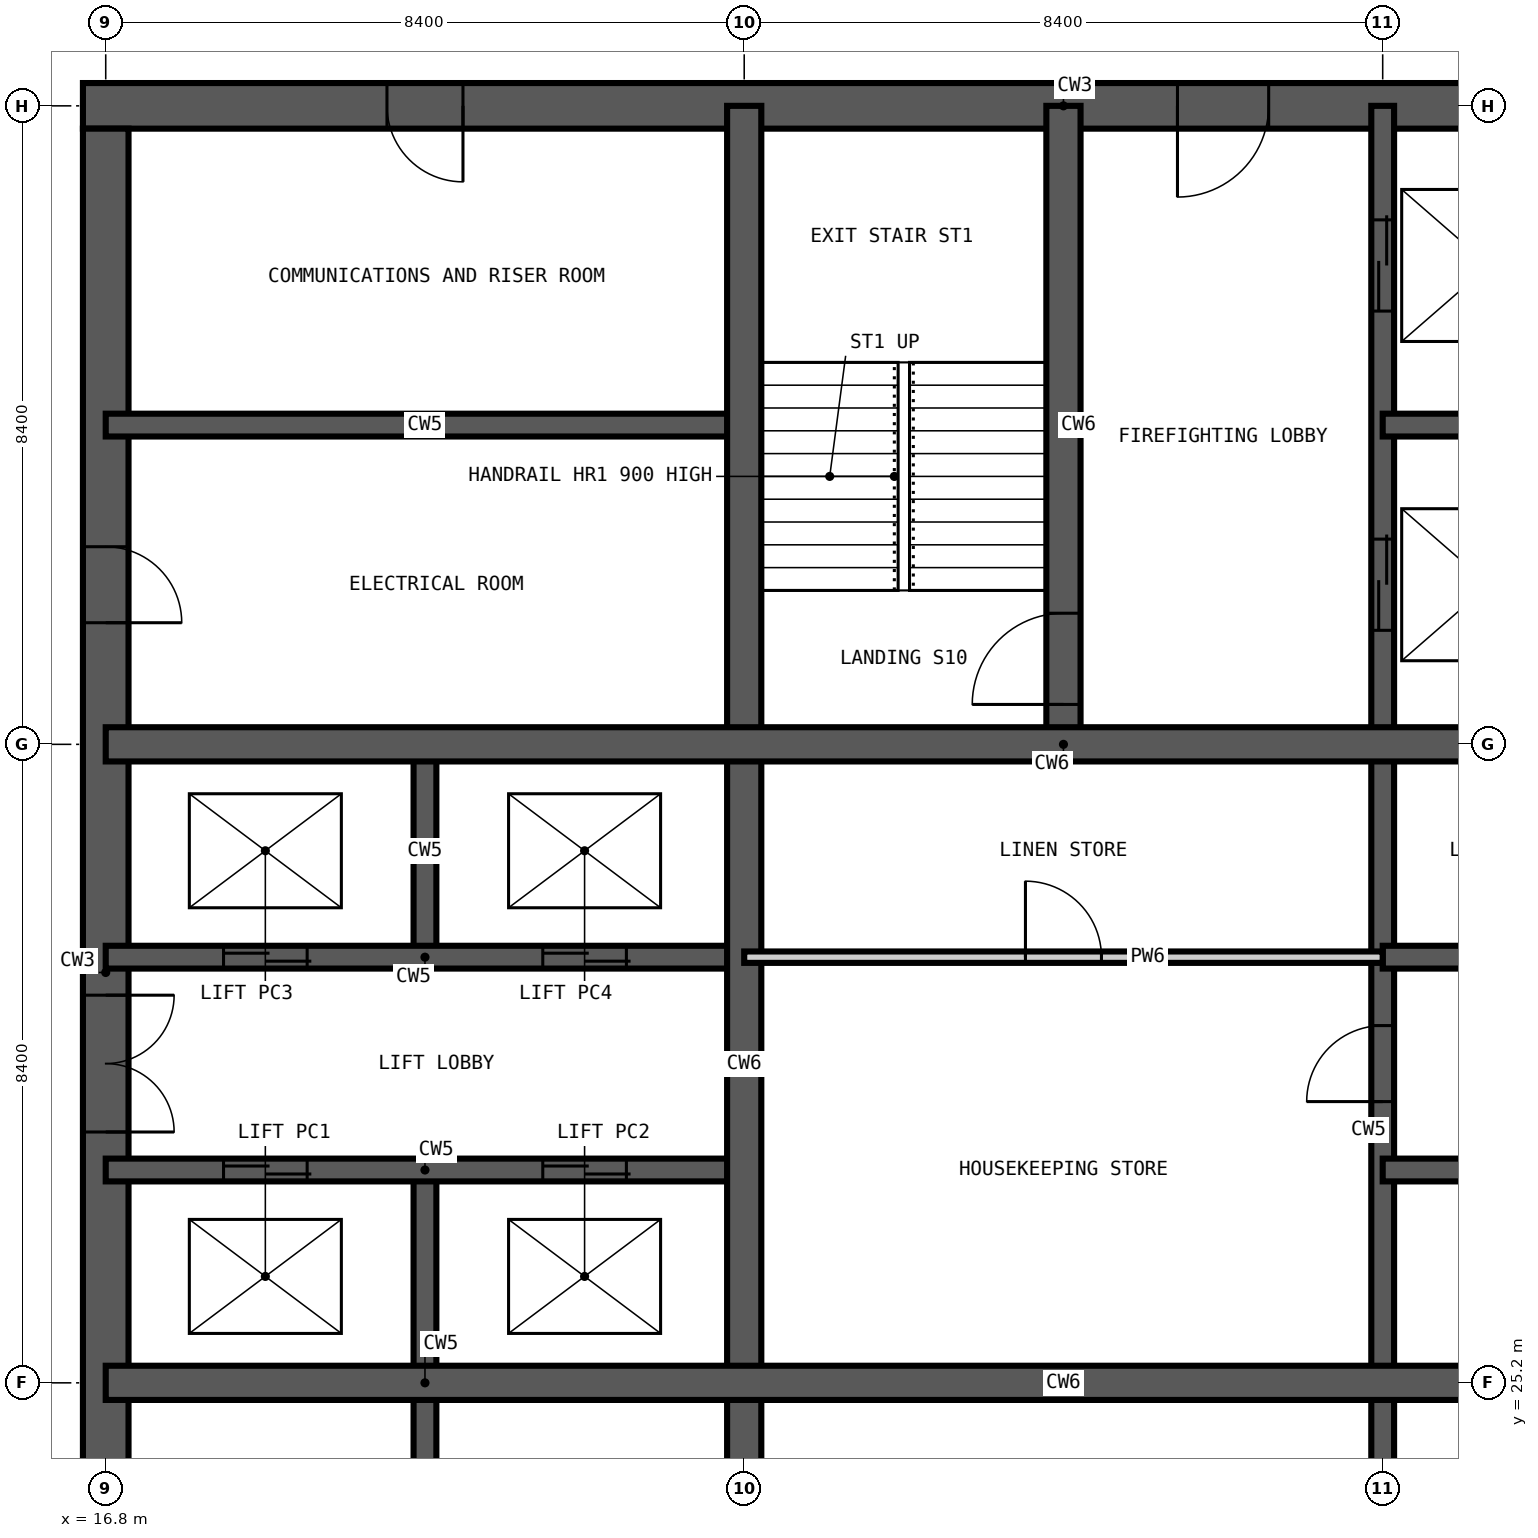
"""IFC4 building model, lengths in metres.
Left out: names, types, materials, properties, quantities, classifications, styles, units other than length and angle.
Written with IfcOpenShell. Run it as: python <this file> out.ifc"""

import sys

from ifc_helpers import new_model, si_unit, direction, frame, frame_2d, origin, place, context, subcontext, project, spatial, rectangle, extrude, element, fill, save


model = new_model("IFC4")
c1 = context("Model", 3, precision=1e-05, world=origin(), true_north=direction((0.0, 1.0)))
c2 = subcontext(c1, "Body", "Model", "MODEL_VIEW")
j1 = project(units=[si_unit("LENGTHUNIT", "METRE"), si_unit("PLANEANGLEUNIT", "RADIAN")], contexts=[c1])
p1 = place(None, origin())
s1 = spatial("IfcSite", under=j1, at=p1, CompositionType="ELEMENT")
p2 = place(p1, origin())
s2 = spatial("IfcBuilding", under=s1, at=p2, CompositionType="ELEMENT")
p3 = place(p2, frame((0.0, 0.0, 198.6)))
s3 = spatial("IfcBuildingStorey", under=s2, at=p3, CompositionType="ELEMENT", Elevation=198.6)
p4 = place(p3, frame((42.3, 42.0, -0.35), z_axis=(0.0, 0.0, 1.0), x_axis=(-1.0, 0.0, 0.0)))
e1 = element("IfcWall", 1, at=p4, inside=s3, PredefinedType="SHEAR", context=c2, shape_type="SweptSolid", body=[
    extrude(rectangle(XDim=25.8, YDim=0.6, at=frame_2d((12.9, 0.0))), origin(), (0.0, 0.0, 1.0), 3.6),
])
p5 = place(p4, frame((20.8, 0.0, 0.35)))
e2 = element("IfcOpeningElement", 2, at=p5, cuts=e1, PredefinedType="OPENING", context=c2, shape_type="SweptSolid", body=[
    extrude(rectangle(XDim=1.0, YDim=2.1, at=frame_2d((0.5, 1.05))), frame((0.0, 0.31, 0.0), z_axis=(0.0, -1.0, 0.0), x_axis=(1.0, 0.0, 0.0)), (0.0, 0.0, 1.0), 0.62),
])
p6 = place(p4, frame((10.2, 0.0, 0.35)))
e3 = element("IfcOpeningElement", 3, at=p6, cuts=e1, PredefinedType="OPENING", context=c2, shape_type="SweptSolid", body=[
    extrude(rectangle(XDim=1.2, YDim=2.2, at=frame_2d((0.6, 1.1))), frame((0.0, 0.31, 0.0), z_axis=(0.0, -1.0, 0.0), x_axis=(1.0, 0.0, 0.0)), (0.0, 0.0, 1.0), 0.62),
])
p7 = place(p3, frame((16.8, 41.7, -0.35), z_axis=(0.0, 0.0, 1.0), x_axis=(0.0, -1.0, 0.0)))
e4 = element("IfcWall", 4, at=p7, inside=s3, PredefinedType="SHEAR", context=c2, shape_type="SweptSolid", body=[
    extrude(rectangle(XDim=24.6, YDim=0.6, at=frame_2d((12.3, 0.0))), origin(), (0.0, 0.0, 1.0), 3.6),
])
p8 = place(p7, frame((11.4, 0.0, 0.35)))
e5 = element("IfcOpeningElement", 5, at=p8, cuts=e4, PredefinedType="OPENING", context=c2, shape_type="SweptSolid", body=[
    extrude(rectangle(XDim=1.8, YDim=2.2, at=frame_2d((0.9, 1.1))), frame((0.0, 0.31, 0.0), z_axis=(0.0, -1.0, 0.0), x_axis=(1.0, 0.0, 0.0)), (0.0, 0.0, 1.0), 0.62),
])
p9 = place(p7, frame((20.2, 0.0, 0.35)))
e6 = element("IfcOpeningElement", 6, at=p9, cuts=e4, PredefinedType="OPENING", context=c2, shape_type="SweptSolid", body=[
    extrude(rectangle(XDim=1.0, YDim=2.1, at=frame_2d((0.5, 1.05))), frame((0.0, 0.31, 0.0), z_axis=(0.0, -1.0, 0.0), x_axis=(1.0, 0.0, 0.0)), (0.0, 0.0, 1.0), 0.62),
])
p10 = place(p7, frame((5.5, 0.0, 0.35)))
e7 = element("IfcOpeningElement", 7, at=p10, cuts=e4, PredefinedType="OPENING", context=c2, shape_type="SweptSolid", body=[
    extrude(rectangle(XDim=1.0, YDim=2.1, at=frame_2d((0.5, 1.05))), frame((0.0, 0.31, 0.0), z_axis=(0.0, -1.0, 0.0), x_axis=(1.0, 0.0, 0.0)), (0.0, 0.0, 1.0), 0.62),
])
p11 = place(p3, frame((21.0, 22.4, -0.35), z_axis=(0.0, 0.0, 1.0), x_axis=(0.0, 1.0, 0.0)))
e8 = element("IfcWall", 8, at=p11, inside=s3, PredefinedType="SHEAR", context=c2, shape_type="SweptSolid", body=[
    extrude(rectangle(XDim=5.6, YDim=0.3, at=frame_2d((2.8, 0.0))), origin(), (0.0, 0.0, 1.0), 3.6),
])
p12 = place(p3, frame((21.0, 30.8, -0.35), z_axis=(0.0, 0.0, 1.0), x_axis=(0.0, 1.0, 0.0)))
e9 = element("IfcWall", 9, at=p12, inside=s3, PredefinedType="SHEAR", context=c2, shape_type="SweptSolid", body=[
    extrude(rectangle(XDim=2.8, YDim=0.3, at=frame_2d((1.4, 0.0))), origin(), (0.0, 0.0, 1.0), 3.6),
])
p13 = place(p3, frame((33.6, 16.8, -0.35), z_axis=(0.0, 0.0, 1.0), x_axis=(0.0, 1.0, 0.0)))
e10 = element("IfcWall", 10, at=p13, inside=s3, PredefinedType="SHEAR", context=c2, shape_type="SweptSolid", body=[
    extrude(rectangle(XDim=25.2, YDim=0.3, at=frame_2d((12.6, 0.0))), origin(), (0.0, 0.0, 1.0), 3.6),
])
p14 = place(p13, frame((22.5, 0.0, 0.35)))
e11 = element("IfcOpeningElement", 11, at=p14, cuts=e10, PredefinedType="OPENING", context=c2, shape_type="SweptSolid", body=[
    extrude(rectangle(XDim=1.2, YDim=2.2, at=frame_2d((0.6, 1.1))), frame((0.0, 0.16, 0.0), z_axis=(0.0, -1.0, 0.0), x_axis=(1.0, 0.0, 0.0)), (0.0, 0.0, 1.0), 0.32),
])
p15 = place(p13, frame((18.3, 0.0, 0.35)))
e12 = element("IfcOpeningElement", 12, at=p15, cuts=e10, PredefinedType="OPENING", context=c2, shape_type="SweptSolid", body=[
    extrude(rectangle(XDim=1.2, YDim=2.2, at=frame_2d((0.6, 1.1))), frame((0.0, 0.16, 0.0), z_axis=(0.0, -1.0, 0.0), x_axis=(1.0, 0.0, 0.0)), (0.0, 0.0, 1.0), 0.32),
])
p16 = place(p13, frame((12.1, 0.0, 0.35)))
e13 = element("IfcOpeningElement", 13, at=p16, cuts=e10, PredefinedType="OPENING", context=c2, shape_type="SweptSolid", body=[
    extrude(rectangle(XDim=1.0, YDim=2.1, at=frame_2d((0.5, 1.05))), frame((0.0, 0.16, 0.0), z_axis=(0.0, -1.0, 0.0), x_axis=(1.0, 0.0, 0.0)), (0.0, 0.0, 1.0), 0.32),
])
p17 = place(p3, frame((16.8, 28.0, -0.35), z_axis=(0.0, 0.0, 1.0), x_axis=(1.0, 0.0, 0.0)))
e14 = element("IfcWall", 14, at=p17, inside=s3, PredefinedType="SHEAR", context=c2, shape_type="SweptSolid", body=[
    extrude(rectangle(XDim=8.4, YDim=0.3, at=frame_2d((4.2, 0.0))), origin(), (0.0, 0.0, 1.0), 3.6),
])
p18 = place(p17, frame((1.55, 0.0, 0.35)))
e15 = element("IfcOpeningElement", 15, at=p18, cuts=e14, PredefinedType="OPENING", context=c2, shape_type="SweptSolid", body=[
    extrude(rectangle(XDim=1.1, YDim=2.2, at=frame_2d((0.55, 1.1))), frame((0.0, 0.16, 0.0), z_axis=(0.0, -1.0, 0.0), x_axis=(1.0, 0.0, 0.0)), (0.0, 0.0, 1.0), 0.32),
])
p19 = place(p17, frame((5.75, 0.0, 0.35)))
e16 = element("IfcOpeningElement", 16, at=p19, cuts=e14, PredefinedType="OPENING", context=c2, shape_type="SweptSolid", body=[
    extrude(rectangle(XDim=1.1, YDim=2.2, at=frame_2d((0.55, 1.1))), frame((0.0, 0.16, 0.0), z_axis=(0.0, -1.0, 0.0), x_axis=(1.0, 0.0, 0.0)), (0.0, 0.0, 1.0), 0.32),
])
p20 = place(p3, frame((33.6, 28.0, -0.35), z_axis=(0.0, 0.0, 1.0), x_axis=(1.0, 0.0, 0.0)))
e17 = element("IfcWall", 17, at=p20, inside=s3, PredefinedType="SHEAR", context=c2, shape_type="SweptSolid", body=[
    extrude(rectangle(XDim=8.4, YDim=0.3, at=frame_2d((4.2, 0.0))), origin(), (0.0, 0.0, 1.0), 3.6),
])
p21 = place(p20, frame((1.6, 0.0, 0.35)))
e18 = element("IfcOpeningElement", 18, at=p21, cuts=e17, PredefinedType="OPENING", context=c2, shape_type="SweptSolid", body=[
    extrude(rectangle(XDim=1.0, YDim=2.1, at=frame_2d((0.5, 1.05))), frame((0.0, 0.16, 0.0), z_axis=(0.0, -1.0, 0.0), x_axis=(1.0, 0.0, 0.0)), (0.0, 0.0, 1.0), 0.32),
])
p22 = place(p20, frame((4.6, 0.0, 0.35)))
e19 = element("IfcOpeningElement", 19, at=p22, cuts=e17, PredefinedType="OPENING", context=c2, shape_type="SweptSolid", body=[
    extrude(rectangle(XDim=1.0, YDim=2.1, at=frame_2d((0.5, 1.05))), frame((0.0, 0.16, 0.0), z_axis=(0.0, -1.0, 0.0), x_axis=(1.0, 0.0, 0.0)), (0.0, 0.0, 1.0), 0.32),
])
p23 = place(p3, frame((16.8, 30.8, -0.35), z_axis=(0.0, 0.0, 1.0), x_axis=(1.0, 0.0, 0.0)))
e20 = element("IfcWall", 20, at=p23, inside=s3, PredefinedType="SHEAR", context=c2, shape_type="SweptSolid", body=[
    extrude(rectangle(XDim=8.4, YDim=0.3, at=frame_2d((4.2, 0.0))), origin(), (0.0, 0.0, 1.0), 3.6),
])
p24 = place(p23, frame((1.55, 0.0, 0.35)))
e21 = element("IfcOpeningElement", 21, at=p24, cuts=e20, PredefinedType="OPENING", context=c2, shape_type="SweptSolid", body=[
    extrude(rectangle(XDim=1.1, YDim=2.2, at=frame_2d((0.55, 1.1))), frame((0.0, 0.16, 0.0), z_axis=(0.0, -1.0, 0.0), x_axis=(1.0, 0.0, 0.0)), (0.0, 0.0, 1.0), 0.32),
])
p25 = place(p23, frame((5.75, 0.0, 0.35)))
e22 = element("IfcOpeningElement", 22, at=p25, cuts=e20, PredefinedType="OPENING", context=c2, shape_type="SweptSolid", body=[
    extrude(rectangle(XDim=1.1, YDim=2.2, at=frame_2d((0.55, 1.1))), frame((0.0, 0.16, 0.0), z_axis=(0.0, -1.0, 0.0), x_axis=(1.0, 0.0, 0.0)), (0.0, 0.0, 1.0), 0.32),
])
for number, where, z_axis, x_axis in (
    (23, (33.6, 30.8, -0.35), (0.0, 0.0, 1.0), (1.0, 0.0, 0.0)),
    (24, (16.8, 37.8, -0.35), (0.0, 0.0, 1.0), (1.0, 0.0, 0.0)),
):
    element("IfcWall", number, at=place(p3, frame(where, z_axis=z_axis, x_axis=x_axis)), inside=s3, PredefinedType="SHEAR", context=c2, shape_type="SweptSolid", body=[
        extrude(rectangle(XDim=8.4, YDim=0.3, at=frame_2d((4.2, 0.0))), origin(), (0.0, 0.0, 1.0), 3.6),
    ])
p26 = place(p3, frame((33.6, 37.8, -0.35), z_axis=(0.0, 0.0, 1.0), x_axis=(1.0, 0.0, 0.0)))
e25 = element("IfcWall", 25, at=p26, inside=s3, PredefinedType="SHEAR", context=c2, shape_type="SweptSolid", body=[
    extrude(rectangle(XDim=2.8, YDim=0.3, at=frame_2d((1.4, 0.0))), origin(), (0.0, 0.0, 1.0), 3.6),
])
p27 = place(p3, frame((25.2, 16.8, -0.35), z_axis=(0.0, 0.0, 1.0), x_axis=(0.0, 1.0, 0.0)))
e26 = element("IfcWall", 26, at=p27, inside=s3, PredefinedType="SHEAR", context=c2, shape_type="SweptSolid", body=[
    extrude(rectangle(XDim=25.2, YDim=0.45, at=frame_2d((12.6, 0.0))), origin(), (0.0, 0.0, 1.0), 3.6),
])
p28 = place(p3, frame((29.4, 33.6, -0.35), z_axis=(0.0, 0.0, 1.0), x_axis=(0.0, 1.0, 0.0)))
e27 = element("IfcWall", 27, at=p28, inside=s3, PredefinedType="SHEAR", context=c2, shape_type="SweptSolid", body=[
    extrude(rectangle(XDim=8.4, YDim=0.45, at=frame_2d((4.2, 0.0))), origin(), (0.0, 0.0, 1.0), 3.6),
])
p29 = place(p28, frame((0.525, 0.0, 0.35)))
e28 = element("IfcOpeningElement", 28, at=p29, cuts=e27, PredefinedType="OPENING", context=c2, shape_type="SweptSolid", body=[
    extrude(rectangle(XDim=1.2, YDim=2.2, at=frame_2d((0.6, 1.1))), frame((0.0, 0.235, 0.0), z_axis=(0.0, -1.0, 0.0), x_axis=(1.0, 0.0, 0.0)), (0.0, 0.0, 1.0), 0.47),
])
for number, where, z_axis, x_axis in (
    (29, (16.8, 25.2, -0.35), (0.0, 0.0, 1.0), (1.0, 0.0, 0.0)),
    (30, (16.8, 33.6, -0.35), (0.0, 0.0, 1.0), (1.0, 0.0, 0.0)),
):
    element("IfcWall", number, at=place(p3, frame(where, z_axis=z_axis, x_axis=x_axis)), inside=s3, PredefinedType="SHEAR", context=c2, shape_type="SweptSolid", body=[
        extrude(rectangle(XDim=25.2, YDim=0.45, at=frame_2d((12.6, 0.0))), origin(), (0.0, 0.0, 1.0), 3.6),
    ])
p30 = place(p3, frame((25.2, 30.8, 0.0), z_axis=(0.0, 0.0, 1.0), x_axis=(1.0, 0.0, 0.0)))
e31 = element("IfcWall", 31, at=p30, inside=s3, PredefinedType="PARTITIONING", context=c2, shape_type="SweptSolid", body=[
    extrude(rectangle(XDim=8.4, YDim=0.15, at=frame_2d((4.2, 0.0))), origin(), (0.0, 0.0, 1.0), 3.25),
])
p31 = place(p30, frame((3.7, 0.0, 0.0)))
e32 = element("IfcOpeningElement", 32, at=p31, cuts=e31, PredefinedType="OPENING", context=c2, shape_type="SweptSolid", body=[
    extrude(rectangle(XDim=1.0, YDim=2.1, at=frame_2d((0.5, 1.05))), frame((0.0, 0.085, 0.0), z_axis=(0.0, -1.0, 0.0), x_axis=(1.0, 0.0, 0.0)), (0.0, 0.0, 1.0), 0.17),
])
p32 = place(p29, origin())
e33 = element("IfcDoor", 33, at=p32, inside=s3, OperationType="SINGLE_SWING_LEFT", PredefinedType="DOOR", context=c2, shape_type="SweptSolid", body=[
    extrude(rectangle(XDim=1.2, YDim=2.2, at=frame_2d((0.6, 1.1))), frame((0.0, 0.025, 0.0), z_axis=(0.0, -1.0, 0.0), x_axis=(1.0, 0.0, 0.0)), (0.0, 0.0, 1.0), 0.05),
])
fill(e28, e33)
p33 = place(p18, origin())
e34 = element("IfcDoor", 34, at=p33, inside=s3, OperationType="DOUBLE_DOOR_SLIDING", PredefinedType="DOOR", context=c2, shape_type="SweptSolid", body=[
    extrude(rectangle(XDim=1.1, YDim=2.2, at=frame_2d((0.55, 1.1))), frame((0.0, 0.025, 0.0), z_axis=(0.0, -1.0, 0.0), x_axis=(1.0, 0.0, 0.0)), (0.0, 0.0, 1.0), 0.05),
])
fill(e15, e34)
p34 = place(p19, origin())
e35 = element("IfcDoor", 35, at=p34, inside=s3, OperationType="DOUBLE_DOOR_SLIDING", PredefinedType="DOOR", context=c2, shape_type="SweptSolid", body=[
    extrude(rectangle(XDim=1.1, YDim=2.2, at=frame_2d((0.55, 1.1))), frame((0.0, 0.025, 0.0), z_axis=(0.0, -1.0, 0.0), x_axis=(1.0, 0.0, 0.0)), (0.0, 0.0, 1.0), 0.05),
])
fill(e16, e35)
p35 = place(p24, origin())
e36 = element("IfcDoor", 36, at=p35, inside=s3, OperationType="DOUBLE_DOOR_SLIDING", PredefinedType="DOOR", context=c2, shape_type="SweptSolid", body=[
    extrude(rectangle(XDim=1.1, YDim=2.2, at=frame_2d((0.55, 1.1))), frame((0.0, 0.025, 0.0), z_axis=(0.0, -1.0, 0.0), x_axis=(1.0, 0.0, 0.0)), (0.0, 0.0, 1.0), 0.05),
])
fill(e21, e36)
p36 = place(p25, origin())
e37 = element("IfcDoor", 37, at=p36, inside=s3, OperationType="DOUBLE_DOOR_SLIDING", PredefinedType="DOOR", context=c2, shape_type="SweptSolid", body=[
    extrude(rectangle(XDim=1.1, YDim=2.2, at=frame_2d((0.55, 1.1))), frame((0.0, 0.025, 0.0), z_axis=(0.0, -1.0, 0.0), x_axis=(1.0, 0.0, 0.0)), (0.0, 0.0, 1.0), 0.05),
])
fill(e22, e37)
p37 = place(p14, origin())
e38 = element("IfcDoor", 38, at=p37, inside=s3, OperationType="DOUBLE_DOOR_SLIDING", PredefinedType="DOOR", context=c2, shape_type="SweptSolid", body=[
    extrude(rectangle(XDim=1.2, YDim=2.2, at=frame_2d((0.6, 1.1))), frame((0.0, 0.025, 0.0), z_axis=(0.0, -1.0, 0.0), x_axis=(1.0, 0.0, 0.0)), (0.0, 0.0, 1.0), 0.05),
])
fill(e11, e38)
p38 = place(p15, origin())
e39 = element("IfcDoor", 39, at=p38, inside=s3, OperationType="DOUBLE_DOOR_SLIDING", PredefinedType="DOOR", context=c2, shape_type="SweptSolid", body=[
    extrude(rectangle(XDim=1.2, YDim=2.2, at=frame_2d((0.6, 1.1))), frame((0.0, 0.025, 0.0), z_axis=(0.0, -1.0, 0.0), x_axis=(1.0, 0.0, 0.0)), (0.0, 0.0, 1.0), 0.05),
])
fill(e12, e39)
p39 = place(p8, origin())
e40 = element("IfcDoor", 40, at=p39, inside=s3, OperationType="DOUBLE_DOOR_DOUBLE_SWING", PredefinedType="DOOR", context=c2, shape_type="SweptSolid", body=[
    extrude(rectangle(XDim=1.8, YDim=2.2, at=frame_2d((0.9, 1.1))), frame((0.0, 0.025, 0.0), z_axis=(0.0, -1.0, 0.0), x_axis=(1.0, 0.0, 0.0)), (0.0, 0.0, 1.0), 0.05),
])
fill(e5, e40)
p40 = place(p10, origin())
e41 = element("IfcDoor", 41, at=p40, inside=s3, OperationType="SINGLE_SWING_RIGHT", PredefinedType="DOOR", context=c2, shape_type="SweptSolid", body=[
    extrude(rectangle(XDim=1.0, YDim=2.1, at=frame_2d((0.5, 1.05))), frame((0.0, 0.025, 0.0), z_axis=(0.0, -1.0, 0.0), x_axis=(1.0, 0.0, 0.0)), (0.0, 0.0, 1.0), 0.05),
])
fill(e7, e41)
p41 = place(p5, origin())
e42 = element("IfcDoor", 42, at=p41, inside=s3, OperationType="SINGLE_SWING_LEFT", PredefinedType="DOOR", context=c2, shape_type="SweptSolid", body=[
    extrude(rectangle(XDim=1.0, YDim=2.1, at=frame_2d((0.5, 1.05))), frame((0.0, 0.025, 0.0), z_axis=(0.0, -1.0, 0.0), x_axis=(1.0, 0.0, 0.0)), (0.0, 0.0, 1.0), 0.05),
])
fill(e2, e42)
p42 = place(p16, origin())
e43 = element("IfcDoor", 43, at=p42, inside=s3, OperationType="SINGLE_SWING_LEFT", PredefinedType="DOOR", context=c2, shape_type="SweptSolid", body=[
    extrude(rectangle(XDim=1.0, YDim=2.1, at=frame_2d((0.5, 1.05))), frame((0.0, 0.025, 0.0), z_axis=(0.0, -1.0, 0.0), x_axis=(1.0, 0.0, 0.0)), (0.0, 0.0, 1.0), 0.05),
])
fill(e13, e43)
p43 = place(p31, origin())
e44 = element("IfcDoor", 44, at=p43, inside=s3, OperationType="SINGLE_SWING_LEFT", PredefinedType="DOOR", context=c2, shape_type="SweptSolid", body=[
    extrude(rectangle(XDim=1.0, YDim=2.1, at=frame_2d((0.5, 1.05))), frame((0.0, 0.025, 0.0), z_axis=(0.0, -1.0, 0.0), x_axis=(1.0, 0.0, 0.0)), (0.0, 0.0, 1.0), 0.05),
])
fill(e32, e44)
p44 = place(p6, origin())
e45 = element("IfcDoor", 45, at=p44, inside=s3, OperationType="SINGLE_SWING_RIGHT", PredefinedType="DOOR", context=c2, shape_type="SweptSolid", body=[
    extrude(rectangle(XDim=1.2, YDim=2.2, at=frame_2d((0.6, 1.1))), frame((0.0, 0.025, 0.0), z_axis=(0.0, -1.0, 0.0), x_axis=(1.0, 0.0, 0.0)), (0.0, 0.0, 1.0), 0.05),
])
fill(e3, e45)
save(model, sys.argv[1])
